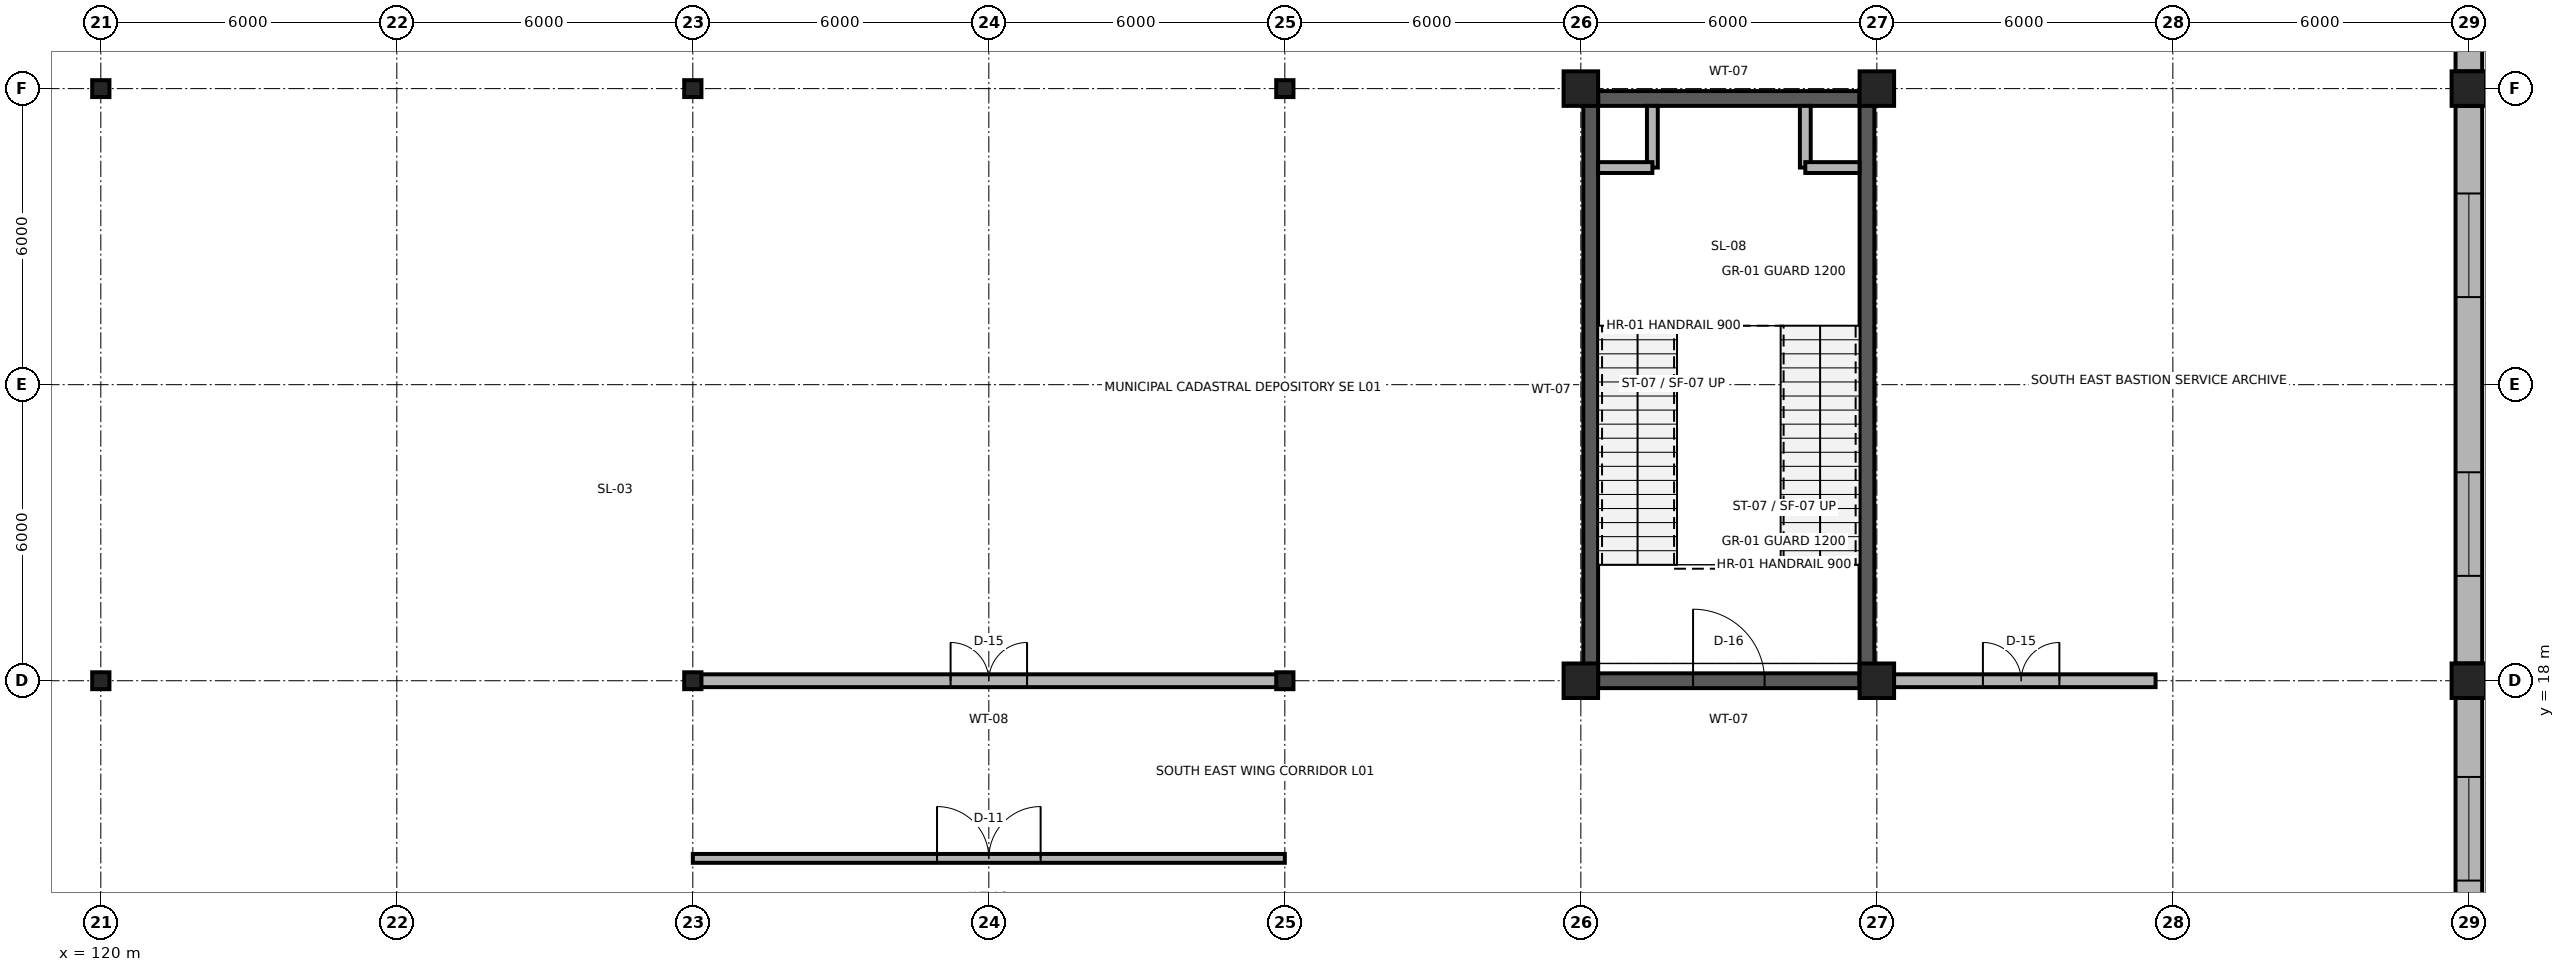
"""IFC4 building model, lengths in metres.
Left out: names, types, materials, properties, quantities, classifications, styles, units other than length and angle.
Written with IfcOpenShell. Run it as: python <this file> out.ifc"""

import sys

from ifc_helpers import new_model, si_unit, direction, frame, frame_2d, origin, origin_2d, place, context, subcontext, project, spatial, rectangle, i_section, extrude, element, fill, save


model = new_model("IFC4")
c1 = context("Model", 3, precision=1e-05, world=origin(), true_north=direction((0.0, 1.0)))
c2 = subcontext(c1, "Body", "Model", "MODEL_VIEW")
j1 = project(units=[si_unit("LENGTHUNIT", "METRE"), si_unit("PLANEANGLEUNIT", "RADIAN")], contexts=[c1])
p1 = place(None, origin())
s1 = spatial("IfcSite", under=j1, at=p1, CompositionType="ELEMENT")
p2 = place(p1, origin())
s2 = spatial("IfcBuilding", under=s1, at=p2, CompositionType="ELEMENT")
p3 = place(p2, origin())
s3 = spatial("IfcBuildingStorey", under=s2, at=p3, CompositionType="ELEMENT", Elevation=0.0)
for number, where, z_axis, x_axis in (
    (1, (120.0, 18.0, 0.0), (0.0, 0.0, 1.0), (1.0, 0.0, 0.0)),
    (2, (132.0, 18.0, 0.0), (0.0, 0.0, 1.0), (1.0, 0.0, 0.0)),
    (3, (144.0, 18.0, 0.0), (0.0, 0.0, 1.0), (1.0, 0.0, 0.0)),
):
    element("IfcColumn", number, at=place(p3, frame(where, z_axis=z_axis, x_axis=x_axis)), inside=s3, PredefinedType="COLUMN", context=c2, shape_type="SweptSolid", body=[
        extrude(i_section(OverallWidth=0.35, OverallDepth=0.343, WebThickness=0.01, FlangeThickness=0.015, FilletRadius=0.02, at=origin_2d()), origin(), (0.0, 0.0, 1.0), 6.0),
    ])
for number, where, z_axis, x_axis in (
    (4, (150.0, 18.0, 0.0), (0.0, 0.0, 1.0), (1.0, 0.0, 0.0)),
    (5, (156.0, 18.0, 0.0), (0.0, 0.0, 1.0), (1.0, 0.0, 0.0)),
    (6, (168.0, 18.0, 0.0), (0.0, 0.0, 1.0), (1.0, 0.0, 0.0)),
):
    element("IfcColumn", number, at=place(p3, frame(where, z_axis=z_axis, x_axis=x_axis)), inside=s3, PredefinedType="COLUMN", context=c2, shape_type="SweptSolid", body=[
        extrude(rectangle(XDim=0.7, YDim=0.7, at=origin_2d()), origin(), (0.0, 0.0, 1.0), 6.0),
    ])
for number, where, z_axis, x_axis in (
    (7, (120.0, 30.0, 0.0), (0.0, 0.0, 1.0), (1.0, 0.0, 0.0)),
    (8, (132.0, 30.0, 0.0), (0.0, 0.0, 1.0), (1.0, 0.0, 0.0)),
    (9, (144.0, 30.0, 0.0), (0.0, 0.0, 1.0), (1.0, 0.0, 0.0)),
):
    element("IfcColumn", number, at=place(p3, frame(where, z_axis=z_axis, x_axis=x_axis)), inside=s3, PredefinedType="COLUMN", context=c2, shape_type="SweptSolid", body=[
        extrude(i_section(OverallWidth=0.35, OverallDepth=0.343, WebThickness=0.01, FlangeThickness=0.015, FilletRadius=0.02, at=origin_2d()), origin(), (0.0, 0.0, 1.0), 6.0),
    ])
for number, where, z_axis, x_axis in (
    (10, (150.0, 30.0, 0.0), (0.0, 0.0, 1.0), (1.0, 0.0, 0.0)),
    (11, (156.0, 30.0, 0.0), (0.0, 0.0, 1.0), (1.0, 0.0, 0.0)),
    (12, (168.0, 30.0, 0.0), (0.0, 0.0, 1.0), (1.0, 0.0, 0.0)),
):
    element("IfcColumn", number, at=place(p3, frame(where, z_axis=z_axis, x_axis=x_axis)), inside=s3, PredefinedType="COLUMN", context=c2, shape_type="SweptSolid", body=[
        extrude(rectangle(XDim=0.7, YDim=0.7, at=origin_2d()), origin(), (0.0, 0.0, 1.0), 6.0),
    ])
p4 = place(p3, frame((168.0, 12.35, 0.0), z_axis=(0.0, 0.0, 1.0), x_axis=(0.0, 1.0, 0.0)))
e13 = element("IfcWall", 13, at=p4, inside=s3, PredefinedType="SOLIDWALL", context=c2, shape_type="SweptSolid", body=[
    extrude(rectangle(XDim=5.3, YDim=0.54, at=frame_2d((2.65, 0.0))), origin(), (0.0, 0.0, 1.0), 5.31),
])
p5 = place(p4, frame((1.6, 0.0, 0.85)))
e14 = element("IfcOpeningElement", 14, at=p5, cuts=e13, PredefinedType="OPENING", context=c2, shape_type="SweptSolid", body=[
    extrude(rectangle(XDim=2.1, YDim=3.4, at=frame_2d((1.05, 1.7))), frame((0.0, 0.285, 0.0), z_axis=(0.0, -1.0, 0.0), x_axis=(1.0, 0.0, 0.0)), (0.0, 0.0, 1.0), 0.57),
])
p6 = place(p3, frame((168.0, 18.35, 0.0), z_axis=(0.0, 0.0, 1.0), x_axis=(0.0, 1.0, 0.0)))
e15 = element("IfcWall", 15, at=p6, inside=s3, PredefinedType="SOLIDWALL", context=c2, shape_type="SweptSolid", body=[
    extrude(rectangle(XDim=11.3, YDim=0.54, at=frame_2d((5.65, 0.0))), origin(), (0.0, 0.0, 1.0), 5.31),
])
p7 = place(p6, frame((1.775, 0.0, 0.85)))
e16 = element("IfcOpeningElement", 16, at=p7, cuts=e15, PredefinedType="OPENING", context=c2, shape_type="SweptSolid", body=[
    extrude(rectangle(XDim=2.1, YDim=3.4, at=frame_2d((1.05, 1.7))), frame((0.0, 0.285, 0.0), z_axis=(0.0, -1.0, 0.0), x_axis=(1.0, 0.0, 0.0)), (0.0, 0.0, 1.0), 0.57),
])
p8 = place(p6, frame((7.425, 0.0, 0.85)))
e17 = element("IfcOpeningElement", 17, at=p8, cuts=e15, PredefinedType="OPENING", context=c2, shape_type="SweptSolid", body=[
    extrude(rectangle(XDim=2.1, YDim=3.4, at=frame_2d((1.05, 1.7))), frame((0.0, 0.285, 0.0), z_axis=(0.0, -1.0, 0.0), x_axis=(1.0, 0.0, 0.0)), (0.0, 0.0, 1.0), 0.57),
])
p9 = place(p3, frame((168.0, 30.35, 0.0), z_axis=(0.0, 0.0, 1.0), x_axis=(0.0, 1.0, 0.0)))
e18 = element("IfcWall", 18, at=p9, inside=s3, PredefinedType="SOLIDWALL", context=c2, shape_type="SweptSolid", body=[
    extrude(rectangle(XDim=5.3, YDim=0.54, at=frame_2d((2.65, 0.0))), origin(), (0.0, 0.0, 1.0), 5.31),
])
p10 = place(p9, frame((1.6, 0.0, 0.85)))
e19 = element("IfcOpeningElement", 19, at=p10, cuts=e18, PredefinedType="OPENING", context=c2, shape_type="SweptSolid", body=[
    extrude(rectangle(XDim=2.1, YDim=3.4, at=frame_2d((1.05, 1.7))), frame((0.0, 0.285, 0.0), z_axis=(0.0, -1.0, 0.0), x_axis=(1.0, 0.0, 0.0)), (0.0, 0.0, 1.0), 0.57),
])
p11 = place(p3, frame((150.35, 18.0, 0.0), z_axis=(0.0, 0.0, 1.0), x_axis=(1.0, 0.0, 0.0)))
e20 = element("IfcWall", 20, at=p11, inside=s3, PredefinedType="SHEAR", context=c2, shape_type="SweptSolid", body=[
    extrude(rectangle(XDim=5.3, YDim=0.3, at=frame_2d((2.65, 0.0))), origin(), (0.0, 0.0, 1.0), 5.76),
])
p12 = place(p11, frame((1.925, 0.0, 0.0)))
e21 = element("IfcOpeningElement", 21, at=p12, cuts=e20, PredefinedType="OPENING", context=c2, shape_type="SweptSolid", body=[
    extrude(rectangle(XDim=1.45, YDim=2.25, at=frame_2d((0.725, 1.125))), frame((0.0, 0.165, 0.0), z_axis=(0.0, -1.0, 0.0), x_axis=(1.0, 0.0, 0.0)), (0.0, 0.0, 1.0), 0.33),
])
p13 = place(p3, frame((150.35, 29.8, 0.0), z_axis=(0.0, 0.0, 1.0), x_axis=(1.0, 0.0, 0.0)))
e22 = element("IfcWall", 22, at=p13, inside=s3, PredefinedType="SHEAR", context=c2, shape_type="SweptSolid", body=[
    extrude(rectangle(XDim=5.3, YDim=0.3, at=frame_2d((2.65, 0.0))), origin(), (0.0, 0.0, 1.0), 5.76),
])
for number, where, z_axis, x_axis in (
    (23, (150.2, 18.0, 0.0), (0.0, 0.0, 1.0), (0.0, 1.0, 0.0)),
    (24, (155.8, 18.0, 0.0), (0.0, 0.0, 1.0), (0.0, 1.0, 0.0)),
):
    element("IfcWall", number, at=place(p3, frame(where, z_axis=z_axis, x_axis=x_axis)), inside=s3, PredefinedType="SHEAR", context=c2, shape_type="SweptSolid", body=[
        extrude(rectangle(XDim=11.8, YDim=0.3, at=frame_2d((5.9, 0.0))), origin(), (0.0, 0.0, 1.0), 5.76),
    ])
p14 = place(p3, frame((151.45, 28.4, 0.0), z_axis=(0.0, 0.0, 1.0), x_axis=(0.0, 1.0, 0.0)))
e25 = element("IfcWall", 25, at=p14, inside=s3, PredefinedType="PARTITIONING", context=c2, shape_type="SweptSolid", body=[
    extrude(rectangle(XDim=1.25, YDim=0.22, at=frame_2d((0.625, 0.0))), origin(), (0.0, 0.0, 1.0), 5.76),
])
p15 = place(p3, frame((150.35, 28.4, 0.0), z_axis=(0.0, 0.0, 1.0), x_axis=(1.0, 0.0, 0.0)))
e26 = element("IfcWall", 26, at=p15, inside=s3, PredefinedType="PARTITIONING", context=c2, shape_type="SweptSolid", body=[
    extrude(rectangle(XDim=1.1, YDim=0.22, at=frame_2d((0.55, 0.0))), origin(), (0.0, 0.0, 1.0), 5.76),
])
p16 = place(p3, frame((154.55, 28.4, 0.0), z_axis=(0.0, 0.0, 1.0), x_axis=(0.0, 1.0, 0.0)))
e27 = element("IfcWall", 27, at=p16, inside=s3, PredefinedType="PARTITIONING", context=c2, shape_type="SweptSolid", body=[
    extrude(rectangle(XDim=1.25, YDim=0.22, at=frame_2d((0.625, 0.0))), origin(), (0.0, 0.0, 1.0), 5.76),
])
p17 = place(p3, frame((154.55, 28.4, 0.0), z_axis=(0.0, 0.0, 1.0), x_axis=(1.0, 0.0, 0.0)))
e28 = element("IfcWall", 28, at=p17, inside=s3, PredefinedType="PARTITIONING", context=c2, shape_type="SweptSolid", body=[
    extrude(rectangle(XDim=1.1, YDim=0.22, at=frame_2d((0.55, 0.0))), origin(), (0.0, 0.0, 1.0), 5.76),
])
p18 = place(p3, frame((132.0, 14.4, 0.0), z_axis=(0.0, 0.0, 1.0), x_axis=(1.0, 0.0, 0.0)))
e29 = element("IfcWall", 29, at=p18, inside=s3, PredefinedType="PARTITIONING", context=c2, shape_type="SweptSolid", body=[
    extrude(rectangle(XDim=12.0, YDim=0.18, at=frame_2d((6.0, 0.0))), origin(), (0.0, 0.0, 1.0), 5.76),
])
p19 = place(p18, frame((4.95, 0.0, 0.0)))
e30 = element("IfcOpeningElement", 30, at=p19, cuts=e29, PredefinedType="OPENING", context=c2, shape_type="SweptSolid", body=[
    extrude(rectangle(XDim=2.1, YDim=2.9, at=frame_2d((1.05, 1.45))), frame((0.0, 0.105, 0.0), z_axis=(0.0, -1.0, 0.0), x_axis=(1.0, 0.0, 0.0)), (0.0, 0.0, 1.0), 0.21),
])
p20 = place(p3, frame((132.0, 18.0, 0.0), z_axis=(0.0, 0.0, 1.0), x_axis=(1.0, 0.0, 0.0)))
e31 = element("IfcWall", 31, at=p20, inside=s3, PredefinedType="PARTITIONING", context=c2, shape_type="SweptSolid", body=[
    extrude(rectangle(XDim=12.0, YDim=0.26, at=frame_2d((6.0, 0.0))), origin(), (0.0, 0.0, 1.0), 5.077),
])
p21 = place(p20, frame((5.225, 0.0, 0.0)))
e32 = element("IfcOpeningElement", 32, at=p21, cuts=e31, PredefinedType="OPENING", context=c2, shape_type="SweptSolid", body=[
    extrude(rectangle(XDim=1.55, YDim=2.3, at=frame_2d((0.775, 1.15))), frame((0.0, 0.145, 0.0), z_axis=(0.0, -1.0, 0.0), x_axis=(1.0, 0.0, 0.0)), (0.0, 0.0, 1.0), 0.29),
])
p22 = place(p3, frame((156.2, 18.0, 0.0), z_axis=(0.0, 0.0, 1.0), x_axis=(1.0, 0.0, 0.0)))
e33 = element("IfcWall", 33, at=p22, inside=s3, PredefinedType="PARTITIONING", context=c2, shape_type="SweptSolid", body=[
    extrude(rectangle(XDim=5.45, YDim=0.26, at=frame_2d((2.725, 0.0))), origin(), (0.0, 0.0, 1.0), 5.077),
])
p23 = place(p22, frame((1.95, 0.0, 0.0)))
e34 = element("IfcOpeningElement", 34, at=p23, cuts=e33, PredefinedType="OPENING", context=c2, shape_type="SweptSolid", body=[
    extrude(rectangle(XDim=1.55, YDim=2.3, at=frame_2d((0.775, 1.15))), frame((0.0, 0.145, 0.0), z_axis=(0.0, -1.0, 0.0), x_axis=(1.0, 0.0, 0.0)), (0.0, 0.0, 1.0), 0.29),
])
p24 = place(p5, origin())
e35 = element("IfcWindow", 35, at=p24, inside=s3, PartitioningType="SINGLE_PANEL", PredefinedType="WINDOW", context=c2, shape_type="SweptSolid", body=[
    extrude(rectangle(XDim=2.1, YDim=3.4, at=frame_2d((1.05, 1.7))), frame((0.0, 0.03, 0.0), z_axis=(0.0, -1.0, 0.0), x_axis=(1.0, 0.0, 0.0)), (0.0, 0.0, 1.0), 0.06),
])
fill(e14, e35)
p25 = place(p7, origin())
e36 = element("IfcWindow", 36, at=p25, inside=s3, PartitioningType="SINGLE_PANEL", PredefinedType="WINDOW", context=c2, shape_type="SweptSolid", body=[
    extrude(rectangle(XDim=2.1, YDim=3.4, at=frame_2d((1.05, 1.7))), frame((0.0, 0.03, 0.0), z_axis=(0.0, -1.0, 0.0), x_axis=(1.0, 0.0, 0.0)), (0.0, 0.0, 1.0), 0.06),
])
fill(e16, e36)
p26 = place(p8, origin())
e37 = element("IfcWindow", 37, at=p26, inside=s3, PartitioningType="SINGLE_PANEL", PredefinedType="WINDOW", context=c2, shape_type="SweptSolid", body=[
    extrude(rectangle(XDim=2.1, YDim=3.4, at=frame_2d((1.05, 1.7))), frame((0.0, 0.03, 0.0), z_axis=(0.0, -1.0, 0.0), x_axis=(1.0, 0.0, 0.0)), (0.0, 0.0, 1.0), 0.06),
])
fill(e17, e37)
p27 = place(p12, origin())
e38 = element("IfcDoor", 38, at=p27, inside=s3, OperationType="SINGLE_SWING_LEFT", PredefinedType="DOOR", context=c2, shape_type="SweptSolid", body=[
    extrude(rectangle(XDim=1.45, YDim=2.25, at=frame_2d((0.725, 1.125))), frame((0.0, 0.025, 0.0), z_axis=(0.0, -1.0, 0.0), x_axis=(1.0, 0.0, 0.0)), (0.0, 0.0, 1.0), 0.05),
])
fill(e21, e38)
p28 = place(p19, origin())
e39 = element("IfcDoor", 39, at=p28, inside=s3, OperationType="DOUBLE_DOOR_SINGLE_SWING", PredefinedType="DOOR", context=c2, shape_type="SweptSolid", body=[
    extrude(rectangle(XDim=2.1, YDim=2.9, at=frame_2d((1.05, 1.45))), frame((0.0, 0.025, 0.0), z_axis=(0.0, -1.0, 0.0), x_axis=(1.0, 0.0, 0.0)), (0.0, 0.0, 1.0), 0.05),
])
fill(e30, e39)
p29 = place(p21, origin())
e40 = element("IfcDoor", 40, at=p29, inside=s3, OperationType="DOUBLE_DOOR_SINGLE_SWING", PredefinedType="DOOR", context=c2, shape_type="SweptSolid", body=[
    extrude(rectangle(XDim=1.55, YDim=2.3, at=frame_2d((0.775, 1.15))), frame((0.0, 0.025, 0.0), z_axis=(0.0, -1.0, 0.0), x_axis=(1.0, 0.0, 0.0)), (0.0, 0.0, 1.0), 0.05),
])
fill(e32, e40)
p30 = place(p23, origin())
e41 = element("IfcDoor", 41, at=p30, inside=s3, OperationType="DOUBLE_DOOR_SINGLE_SWING", PredefinedType="DOOR", context=c2, shape_type="SweptSolid", body=[
    extrude(rectangle(XDim=1.55, YDim=2.3, at=frame_2d((0.775, 1.15))), frame((0.0, 0.025, 0.0), z_axis=(0.0, -1.0, 0.0), x_axis=(1.0, 0.0, 0.0)), (0.0, 0.0, 1.0), 0.05),
])
fill(e34, e41)
save(model, sys.argv[1])
